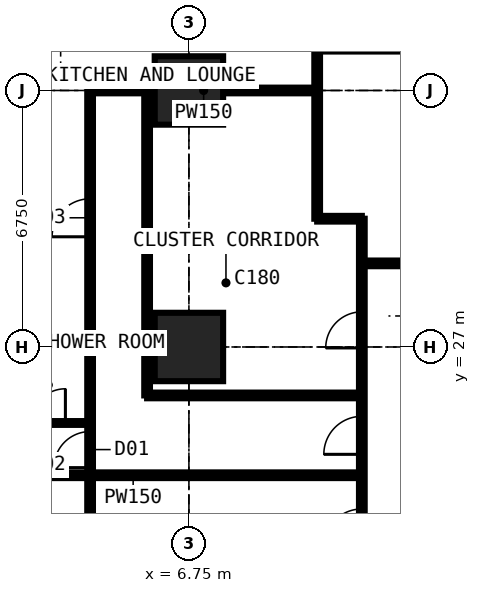
"""IFC4 building model, lengths in metres.
Left out: names, types, materials, properties, quantities, classifications, styles, units other than length and angle.
Written with IfcOpenShell. Run it as: python <this file> out.ifc"""

import sys

from ifc_helpers import new_model, si_unit, direction, frame, frame_2d, origin, origin_2d, place, context, subcontext, project, spatial, rectangle, extrude, element, fill, save


model = new_model("IFC4")
c1 = context("Model", 3, precision=1e-05, world=origin(), true_north=direction((0.0, 1.0)))
c2 = subcontext(c1, "Body", "Model", "MODEL_VIEW")
j1 = project(units=[si_unit("LENGTHUNIT", "METRE"), si_unit("PLANEANGLEUNIT", "RADIAN")], contexts=[c1])
p1 = place(None, origin())
s1 = spatial("IfcSite", under=j1, at=p1, CompositionType="ELEMENT")
p2 = place(p1, origin())
s2 = spatial("IfcBuilding", under=s1, at=p2, CompositionType="ELEMENT")
p3 = place(p2, frame((0.0, 0.0, 57.6)))
s3 = spatial("IfcBuildingStorey", under=s2, at=p3, CompositionType="ELEMENT", Elevation=57.6)
for number, where, z_axis, x_axis in (
    (1, (6.75, 27.0, 0.0), (0.0, 0.0, 1.0), (1.0, 0.0, 0.0)),
    (2, (6.75, 33.75, 0.0), (0.0, 0.0, 1.0), (1.0, 0.0, 0.0)),
):
    element("IfcColumn", number, at=place(p3, frame(where, z_axis=z_axis, x_axis=x_axis)), inside=s3, PredefinedType="COLUMN", context=c2, shape_type="SweptSolid", body=[
        extrude(rectangle(XDim=1.8, YDim=1.8, at=origin_2d()), origin(), (0.0, 0.0, 1.0), 3.6),
    ])
p4 = place(p3, frame((-0.734, 23.625, 0.0), z_axis=(0.0, 0.0, 1.0), x_axis=(1.0, 0.0, 0.0)))
e3 = element("IfcWall", 3, at=p4, inside=s3, PredefinedType="PARTITIONING", context=c2, shape_type="SweptSolid", body=[
    extrude(rectangle(XDim=12.034, YDim=0.15, at=frame_2d((6.017, 0.0))), origin(), (0.0, 0.0, 1.0), 3.375),
])
p5 = place(p3, frame((-0.734, 27.0, 0.0), z_axis=(0.0, 0.0, 1.0), x_axis=(1.0, 0.0, 0.0)))
e4 = element("IfcWall", 4, at=p5, inside=s3, PredefinedType="PARTITIONING", context=c2, shape_type="SweptSolid", body=[
    extrude(rectangle(XDim=4.884, YDim=0.15, at=frame_2d((2.442, 0.0))), origin(), (0.0, 0.0, 1.0), 2.877),
])
p6 = place(p3, frame((1.95, 25.0, 0.0), z_axis=(0.0, 0.0, 1.0), x_axis=(1.0, 0.0, 0.0)))
e5 = element("IfcWall", 5, at=p6, inside=s3, PredefinedType="PARTITIONING", context=c2, shape_type="SweptSolid", body=[
    extrude(rectangle(XDim=2.2, YDim=0.1, at=frame_2d((1.1, 0.0))), origin(), (0.0, 0.0, 1.0), 3.375),
])
p7 = place(p6, frame((0.65, 0.0, 0.0)))
e6 = element("IfcOpeningElement", 6, at=p7, cuts=e5, PredefinedType="OPENING", context=c2, shape_type="SweptSolid", body=[
    extrude(rectangle(XDim=0.9, YDim=2.2, at=frame_2d((0.45, 1.1))), frame((0.0, 0.06, 0.0), z_axis=(0.0, -1.0, 0.0), x_axis=(1.0, 0.0, 0.0)), (0.0, 0.0, 1.0), 0.12),
])
p8 = place(p3, frame((4.15, 10.125, 0.0), z_axis=(0.0, 0.0, 1.0), x_axis=(0.0, 1.0, 0.0)))
e7 = element("IfcWall", 7, at=p8, inside=s3, PredefinedType="PARTITIONING", context=c2, shape_type="SweptSolid", body=[
    extrude(rectangle(XDim=23.625, YDim=0.15, at=frame_2d((11.812, 0.0))), origin(), (0.0, 0.0, 1.0), 3.375),
])
p9 = place(p8, frame((19.775, 0.0, 0.0)))
e8 = element("IfcOpeningElement", 8, at=p9, cuts=e7, PredefinedType="OPENING", context=c2, shape_type="SweptSolid", body=[
    extrude(rectangle(XDim=1.0, YDim=2.2, at=frame_2d((0.5, 1.1))), frame((0.0, 0.085, 0.0), z_axis=(0.0, -1.0, 0.0), x_axis=(1.0, 0.0, 0.0)), (0.0, 0.0, 1.0), 0.17),
])
p10 = place(p8, frame((13.7, 0.0, 0.0)))
e9 = element("IfcOpeningElement", 9, at=p10, cuts=e7, PredefinedType="OPENING", context=c2, shape_type="SweptSolid", body=[
    extrude(rectangle(XDim=0.95, YDim=2.2, at=frame_2d((0.475, 1.1))), frame((0.0, 0.085, 0.0), z_axis=(0.0, -1.0, 0.0), x_axis=(1.0, 0.0, 0.0)), (0.0, 0.0, 1.0), 0.17),
])
p11 = place(p8, frame((4.2, 0.0, 0.0)))
e10 = element("IfcOpeningElement", 10, at=p11, cuts=e7, PredefinedType="OPENING", context=c2, shape_type="SweptSolid", body=[
    extrude(rectangle(XDim=0.95, YDim=2.2, at=frame_2d((0.475, 1.1))), frame((0.0, 0.085, 0.0), z_axis=(0.0, -1.0, 0.0), x_axis=(1.0, 0.0, 0.0)), (0.0, 0.0, 1.0), 0.17),
])
p12 = place(p8, frame((10.95, 0.0, 0.0)))
e11 = element("IfcOpeningElement", 11, at=p12, cuts=e7, PredefinedType="OPENING", context=c2, shape_type="SweptSolid", body=[
    extrude(rectangle(XDim=0.95, YDim=2.2, at=frame_2d((0.475, 1.1))), frame((0.0, 0.085, 0.0), z_axis=(0.0, -1.0, 0.0), x_axis=(1.0, 0.0, 0.0)), (0.0, 0.0, 1.0), 0.17),
])
p13 = place(p3, frame((4.15, 33.75, 0.0), z_axis=(0.0, 0.0, 1.0), x_axis=(1.0, 0.0, 0.0)))
e12 = element("IfcWall", 12, at=p13, inside=s3, PredefinedType="PARTITIONING", context=c2, shape_type="SweptSolid", body=[
    extrude(rectangle(XDim=5.975, YDim=0.15, at=frame_2d((2.988, 0.0))), origin(), (0.0, 0.0, 1.0), 2.877),
])
p14 = place(p3, frame((5.65, 25.725, 0.0), z_axis=(0.0, 0.0, 1.0), x_axis=(0.0, 1.0, 0.0)))
e13 = element("IfcWall", 13, at=p14, inside=s3, PredefinedType="PARTITIONING", context=c2, shape_type="SweptSolid", body=[
    extrude(rectangle(XDim=8.025, YDim=0.15, at=frame_2d((4.012, 0.0))), origin(), (0.0, 0.0, 1.0), 3.375),
])
p15 = place(p3, frame((5.65, 25.725, 0.0), z_axis=(0.0, 0.0, 1.0), x_axis=(1.0, 0.0, 0.0)))
e14 = element("IfcWall", 14, at=p15, inside=s3, PredefinedType="PARTITIONING", context=c2, shape_type="SweptSolid", body=[
    extrude(rectangle(XDim=5.65, YDim=0.15, at=frame_2d((2.825, 0.0))), origin(), (0.0, 0.0, 1.0), 3.375),
])
p16 = place(p3, frame((10.125, 30.375, 0.0), z_axis=(0.0, 0.0, 1.0), x_axis=(0.0, 1.0, 0.0)))
e15 = element("IfcWall", 15, at=p16, inside=s3, PredefinedType="PARTITIONING", context=c2, shape_type="SweptSolid", body=[
    extrude(rectangle(XDim=10.859, YDim=0.15, at=frame_2d((5.429, 0.0))), origin(), (0.0, 0.0, 1.0), 3.375),
])
p17 = place(p3, frame((10.125, 30.375, 0.0), z_axis=(0.0, 0.0, 1.0), x_axis=(1.0, 0.0, 0.0)))
e16 = element("IfcWall", 16, at=p17, inside=s3, PredefinedType="PARTITIONING", context=c2, shape_type="SweptSolid", body=[
    extrude(rectangle(XDim=1.175, YDim=0.15, at=frame_2d((0.587, 0.0))), origin(), (0.0, 0.0, 1.0), 3.375),
])
p18 = place(p3, frame((11.3, 11.3, 0.0), z_axis=(0.0, 0.0, 1.0), x_axis=(0.0, 1.0, 0.0)))
e17 = element("IfcWall", 17, at=p18, inside=s3, PredefinedType="PARTITIONING", context=c2, shape_type="SweptSolid", body=[
    extrude(rectangle(XDim=19.075, YDim=0.15, at=frame_2d((9.538, 0.0))), origin(), (0.0, 0.0, 1.0), 3.375),
])
p19 = place(p18, frame((12.875, 0.0, 0.0)))
e18 = element("IfcOpeningElement", 18, at=p19, cuts=e17, PredefinedType="OPENING", context=c2, shape_type="SweptSolid", body=[
    extrude(rectangle(XDim=1.0, YDim=2.2, at=frame_2d((0.5, 1.1))), frame((0.0, 0.085, 0.0), z_axis=(0.0, -1.0, 0.0), x_axis=(1.0, 0.0, 0.0)), (0.0, 0.0, 1.0), 0.17),
])
p20 = place(p18, frame((10.438, 0.0, 0.0)))
e19 = element("IfcOpeningElement", 19, at=p20, cuts=e17, PredefinedType="OPENING", context=c2, shape_type="SweptSolid", body=[
    extrude(rectangle(XDim=1.0, YDim=2.2, at=frame_2d((0.5, 1.1))), frame((0.0, 0.085, 0.0), z_axis=(0.0, -1.0, 0.0), x_axis=(1.0, 0.0, 0.0)), (0.0, 0.0, 1.0), 0.17),
])
p21 = place(p18, frame((15.675, 0.0, 0.0)))
e20 = element("IfcOpeningElement", 20, at=p21, cuts=e17, PredefinedType="OPENING", context=c2, shape_type="SweptSolid", body=[
    extrude(rectangle(XDim=0.95, YDim=2.2, at=frame_2d((0.475, 1.1))), frame((0.0, 0.085, 0.0), z_axis=(0.0, -1.0, 0.0), x_axis=(1.0, 0.0, 0.0)), (0.0, 0.0, 1.0), 0.17),
])
p22 = place(p3, frame((11.3, 29.2, 0.0), z_axis=(0.0, 0.0, 1.0), x_axis=(1.0, 0.0, 0.0)))
e21 = element("IfcWall", 21, at=p22, inside=s3, PredefinedType="PARTITIONING", context=c2, shape_type="SweptSolid", body=[
    extrude(rectangle(XDim=19.075, YDim=0.15, at=frame_2d((9.538, 0.0))), origin(), (0.0, 0.0, 1.0), 3.375),
])
p23 = place(p22, frame((12.875, 0.0, 0.0)))
e22 = element("IfcOpeningElement", 22, at=p23, cuts=e21, PredefinedType="OPENING", context=c2, shape_type="SweptSolid", body=[
    extrude(rectangle(XDim=1.0, YDim=2.2, at=frame_2d((0.5, 1.1))), frame((0.0, 0.085, 0.0), z_axis=(0.0, -1.0, 0.0), x_axis=(1.0, 0.0, 0.0)), (0.0, 0.0, 1.0), 0.17),
])
p24 = place(p22, frame((10.438, 0.0, 0.0)))
e23 = element("IfcOpeningElement", 23, at=p24, cuts=e21, PredefinedType="OPENING", context=c2, shape_type="SweptSolid", body=[
    extrude(rectangle(XDim=1.0, YDim=2.2, at=frame_2d((0.5, 1.1))), frame((0.0, 0.085, 0.0), z_axis=(0.0, -1.0, 0.0), x_axis=(1.0, 0.0, 0.0)), (0.0, 0.0, 1.0), 0.17),
])
p25 = place(p22, frame((15.675, 0.0, 0.0)))
e24 = element("IfcOpeningElement", 24, at=p25, cuts=e21, PredefinedType="OPENING", context=c2, shape_type="SweptSolid", body=[
    extrude(rectangle(XDim=0.95, YDim=2.2, at=frame_2d((0.475, 1.1))), frame((0.0, 0.085, 0.0), z_axis=(0.0, -1.0, 0.0), x_axis=(1.0, 0.0, 0.0)), (0.0, 0.0, 1.0), 0.17),
])
p26 = place(p9, origin())
e25 = element("IfcDoor", 25, at=p26, inside=s3, OperationType="SINGLE_SWING_LEFT", PredefinedType="DOOR", context=c2, shape_type="SweptSolid", body=[
    extrude(rectangle(XDim=1.0, YDim=2.2, at=frame_2d((0.5, 1.1))), frame((0.0, 0.025, 0.0), z_axis=(0.0, -1.0, 0.0), x_axis=(1.0, 0.0, 0.0)), (0.0, 0.0, 1.0), 0.05),
])
fill(e8, e25)
p27 = place(p10, origin())
e26 = element("IfcDoor", 26, at=p27, inside=s3, OperationType="SINGLE_SWING_LEFT", PredefinedType="DOOR", context=c2, shape_type="SweptSolid", body=[
    extrude(rectangle(XDim=0.95, YDim=2.2, at=frame_2d((0.475, 1.1))), frame((0.0, 0.025, 0.0), z_axis=(0.0, -1.0, 0.0), x_axis=(1.0, 0.0, 0.0)), (0.0, 0.0, 1.0), 0.05),
])
fill(e9, e26)
p28 = place(p7, origin())
e27 = element("IfcDoor", 27, at=p28, inside=s3, OperationType="SINGLE_SWING_RIGHT", PredefinedType="DOOR", context=c2, shape_type="SweptSolid", body=[
    extrude(rectangle(XDim=0.9, YDim=2.2, at=frame_2d((0.45, 1.1))), frame((0.0, 0.025, 0.0), z_axis=(0.0, -1.0, 0.0), x_axis=(1.0, 0.0, 0.0)), (0.0, 0.0, 1.0), 0.05),
])
fill(e6, e27)
p29 = place(p19, origin())
e28 = element("IfcDoor", 28, at=p29, inside=s3, OperationType="SINGLE_SWING_LEFT", PredefinedType="DOOR", context=c2, shape_type="SweptSolid", body=[
    extrude(rectangle(XDim=1.0, YDim=2.2, at=frame_2d((0.5, 1.1))), frame((0.0, 0.025, 0.0), z_axis=(0.0, -1.0, 0.0), x_axis=(1.0, 0.0, 0.0)), (0.0, 0.0, 1.0), 0.05),
])
fill(e18, e28)
p30 = place(p20, origin())
e29 = element("IfcDoor", 29, at=p30, inside=s3, OperationType="SINGLE_SWING_LEFT", PredefinedType="DOOR", context=c2, shape_type="SweptSolid", body=[
    extrude(rectangle(XDim=1.0, YDim=2.2, at=frame_2d((0.5, 1.1))), frame((0.0, 0.025, 0.0), z_axis=(0.0, -1.0, 0.0), x_axis=(1.0, 0.0, 0.0)), (0.0, 0.0, 1.0), 0.05),
])
fill(e19, e29)
p31 = place(p21, origin())
e30 = element("IfcDoor", 30, at=p31, inside=s3, OperationType="SINGLE_SWING_LEFT", PredefinedType="DOOR", context=c2, shape_type="SweptSolid", body=[
    extrude(rectangle(XDim=0.95, YDim=2.2, at=frame_2d((0.475, 1.1))), frame((0.0, 0.025, 0.0), z_axis=(0.0, -1.0, 0.0), x_axis=(1.0, 0.0, 0.0)), (0.0, 0.0, 1.0), 0.05),
])
fill(e20, e30)
save(model, sys.argv[1])
